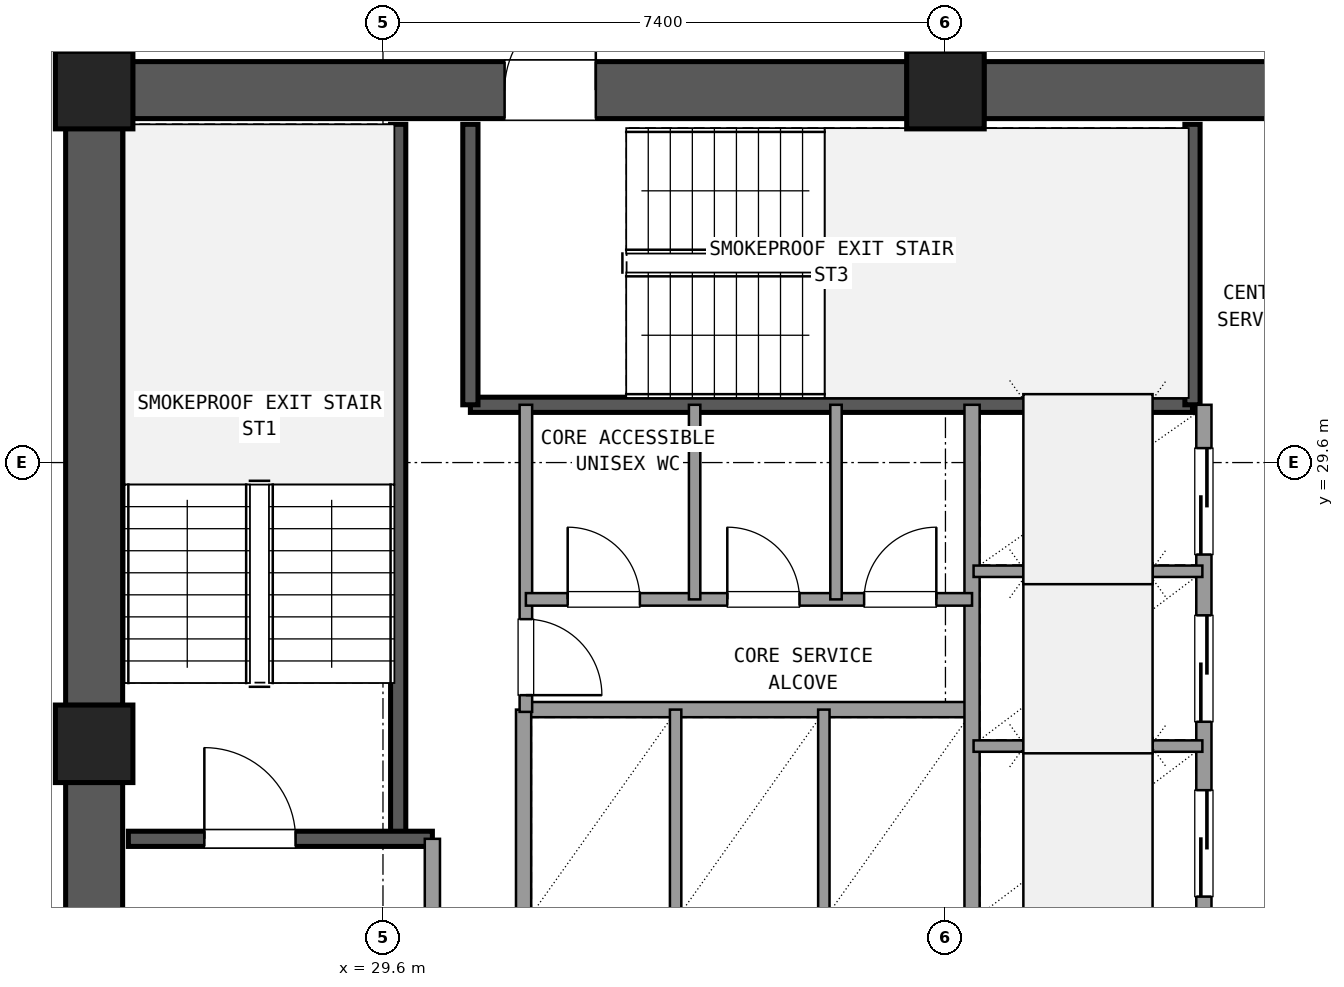
"""IFC4 building model, lengths in metres.
Left out: names, types, materials, properties, quantities, classifications, styles, units other than length and angle.
Written with IfcOpenShell. Run it as: python <this file> out.ifc"""

import sys

from ifc_helpers import new_model, si_unit, direction, frame, frame_2d, origin, origin_2d, place, context, subcontext, project, spatial, rectangle, extrude, element, fill, save


model = new_model("IFC4")
c1 = context("Model", 3, precision=1e-05, world=origin(), true_north=direction((0.0, 1.0)))
c2 = subcontext(c1, "Body", "Model", "MODEL_VIEW")
j1 = project(units=[si_unit("LENGTHUNIT", "METRE"), si_unit("PLANEANGLEUNIT", "RADIAN")], contexts=[c1])
p1 = place(None, origin())
s1 = spatial("IfcSite", under=j1, at=p1, CompositionType="ELEMENT")
p2 = place(p1, origin())
s2 = spatial("IfcBuilding", under=s1, at=p2, CompositionType="ELEMENT")
p3 = place(p2, frame((0.0, 0.0, 149.22)))
s3 = spatial("IfcBuildingStorey", under=s2, at=p3, CompositionType="ELEMENT", Elevation=149.22)
for number, where, z_axis, x_axis in (
    (1, (37.0, 34.5, 0.0), (0.0, 0.0, 1.0), (1.0, 0.0, 0.0)),
    (2, (25.8, 34.5, 0.0), (0.0, 0.0, 1.0), (1.0, 0.0, 0.0)),
    (3, (25.8, 25.9, 0.0), (0.0, 0.0, 1.0), (1.0, 0.0, 0.0)),
):
    element("IfcColumn", number, at=place(p3, frame(where, z_axis=z_axis, x_axis=x_axis)), inside=s3, PredefinedType="COLUMN", context=c2, shape_type="SweptSolid", body=[
        extrude(rectangle(XDim=1.02, YDim=1.02, at=origin_2d()), origin(), (0.0, 0.0, 1.0), 3.6),
    ])
p4 = place(p3, frame((47.695, 34.5, 0.0), z_axis=(0.0, 0.0, 1.0), x_axis=(-1.0, 0.0, 0.0)))
e4 = element("IfcWall", 4, at=p4, inside=s3, PredefinedType="SHEAR", context=c2, shape_type="SweptSolid", body=[
    extrude(rectangle(XDim=10.19, YDim=0.75, at=frame_2d((5.095, 0.0))), origin(), (0.0, 0.0, 1.0), 3.32),
])
p5 = place(p4, frame((4.595, 0.0, 0.0)))
e5 = element("IfcOpeningElement", 5, at=p5, cuts=e4, PredefinedType="OPENING", context=c2, shape_type="SweptSolid", body=[
    extrude(rectangle(XDim=1.6, YDim=2.2, at=frame_2d((0.8, 1.1))), frame((0.0, 0.385, 0.0), z_axis=(0.0, -1.0, 0.0), x_axis=(1.0, 0.0, 0.0)), (0.0, 0.0, 1.0), 0.77),
])
p6 = place(p3, frame((36.495, 34.5, 0.0), z_axis=(0.0, 0.0, 1.0), x_axis=(-1.0, 0.0, 0.0)))
e6 = element("IfcWall", 6, at=p6, inside=s3, PredefinedType="SHEAR", context=c2, shape_type="SweptSolid", body=[
    extrude(rectangle(XDim=10.19, YDim=0.75, at=frame_2d((5.095, 0.0))), origin(), (0.0, 0.0, 1.0), 3.32),
])
p7 = place(p6, frame((4.095, 0.0, 0.0)))
e7 = element("IfcOpeningElement", 7, at=p7, cuts=e6, PredefinedType="OPENING", context=c2, shape_type="SweptSolid", body=[
    extrude(rectangle(XDim=1.2, YDim=2.15, at=frame_2d((0.6, 1.075))), frame((0.0, 0.385, 0.0), z_axis=(0.0, -1.0, 0.0), x_axis=(1.0, 0.0, 0.0)), (0.0, 0.0, 1.0), 0.77),
])
p8 = place(p3, frame((25.8, 33.995, 0.0), z_axis=(0.0, 0.0, 1.0), x_axis=(0.0, -1.0, 0.0)))
e8 = element("IfcWall", 8, at=p8, inside=s3, PredefinedType="SHEAR", context=c2, shape_type="SweptSolid", body=[
    extrude(rectangle(XDim=7.59, YDim=0.75, at=frame_2d((3.795, 0.0))), origin(), (0.0, 0.0, 1.0), 3.32),
])
p9 = place(p3, frame((25.8, 25.395, 0.0), z_axis=(0.0, 0.0, 1.0), x_axis=(0.0, -1.0, 0.0)))
e9 = element("IfcWall", 9, at=p9, inside=s3, PredefinedType="SHEAR", context=c2, shape_type="SweptSolid", body=[
    extrude(rectangle(XDim=7.59, YDim=0.75, at=frame_2d((3.795, 0.0))), origin(), (0.0, 0.0, 1.0), 3.32),
])
p10 = place(p9, frame((2.145, 0.0, 0.0)))
e10 = element("IfcOpeningElement", 10, at=p10, cuts=e9, PredefinedType="OPENING", context=c2, shape_type="SweptSolid", body=[
    extrude(rectangle(XDim=1.2, YDim=2.15, at=frame_2d((0.6, 1.075))), frame((0.0, 0.385, 0.0), z_axis=(0.0, -1.0, 0.0), x_axis=(1.0, 0.0, 0.0)), (0.0, 0.0, 1.0), 0.77),
])
p11 = place(p3, frame((29.8, 24.65, 0.0), z_axis=(0.0, 0.0, 1.0), x_axis=(0.0, 1.0, 0.0)))
e11 = element("IfcWall", 11, at=p11, inside=s3, PredefinedType="SHEAR", context=c2, shape_type="SweptSolid", body=[
    extrude(rectangle(XDim=9.4, YDim=0.2, at=frame_2d((4.7, 0.0))), origin(), (0.0, 0.0, 1.0), 3.32),
])
p12 = place(p3, frame((26.25, 24.65, 0.0), z_axis=(0.0, 0.0, 1.0), x_axis=(1.0, 0.0, 0.0)))
e12 = element("IfcWall", 12, at=p12, inside=s3, PredefinedType="SHEAR", context=c2, shape_type="SweptSolid", body=[
    extrude(rectangle(XDim=4.0, YDim=0.2, at=frame_2d((2.0, 0.0))), origin(), (0.0, 0.0, 1.0), 3.32),
])
p13 = place(p12, frame((1.0, 0.0, 0.0)))
e13 = element("IfcOpeningElement", 13, at=p13, cuts=e12, PredefinedType="OPENING", context=c2, shape_type="SweptSolid", body=[
    extrude(rectangle(XDim=1.2, YDim=2.15, at=frame_2d((0.6, 1.075))), frame((0.0, 0.11, 0.0), z_axis=(0.0, -1.0, 0.0), x_axis=(1.0, 0.0, 0.0)), (0.0, 0.0, 1.0), 0.22),
])
p14 = place(p3, frame((30.75, 30.36, 0.0), z_axis=(0.0, 0.0, 1.0), x_axis=(1.0, 0.0, 0.0)))
e14 = element("IfcWall", 14, at=p14, inside=s3, PredefinedType="SHEAR", context=c2, shape_type="SweptSolid", body=[
    extrude(rectangle(XDim=9.5, YDim=0.2, at=frame_2d((4.75, 0.0))), origin(), (0.0, 0.0, 1.0), 3.32),
])
for number, where, z_axis, x_axis in (
    (15, (30.75, 30.36, 0.0), (0.0, 0.0, 1.0), (0.0, 1.0, 0.0)),
    (16, (40.25, 30.36, 0.0), (0.0, 0.0, 1.0), (0.0, 1.0, 0.0)),
):
    element("IfcWall", number, at=place(p3, frame(where, z_axis=z_axis, x_axis=x_axis)), inside=s3, PredefinedType="SHEAR", context=c2, shape_type="SweptSolid", body=[
        extrude(rectangle(XDim=3.69, YDim=0.2, at=frame_2d((1.845, 0.0))), origin(), (0.0, 0.0, 1.0), 3.32),
    ])
p15 = place(p3, frame((30.25, 17.75, 0.0), z_axis=(0.0, 0.0, 1.0), x_axis=(0.0, 1.0, 0.0)))
e17 = element("IfcWall", 17, at=p15, inside=s3, PredefinedType="SOLIDWALL", context=c2, shape_type="SweptSolid", body=[
    extrude(rectangle(XDim=6.9, YDim=0.2, at=frame_2d((3.45, 0.0))), origin(), (0.0, 0.0, 1.0), 2.61),
])
p16 = place(p15, frame((4.15, 0.0, 0.0)))
e18 = element("IfcOpeningElement", 18, at=p16, cuts=e17, PredefinedType="OPENING", context=c2, shape_type="SweptSolid", body=[
    extrude(rectangle(XDim=1.2, YDim=2.15, at=frame_2d((0.6, 1.075))), frame((0.0, 0.11, 0.0), z_axis=(0.0, -1.0, 0.0), x_axis=(1.0, 0.0, 0.0)), (0.0, 0.0, 1.0), 0.22),
])
p17 = place(p3, frame((31.45, 26.35, 0.0), z_axis=(0.0, 0.0, 1.0), x_axis=(1.0, 0.0, 0.0)))
e19 = element("IfcWall", 19, at=p17, inside=s3, PredefinedType="SOLIDWALL", context=c2, shape_type="SweptSolid", body=[
    extrude(rectangle(XDim=5.9, YDim=0.2, at=frame_2d((2.95, 0.0))), origin(), (0.0, 0.0, 1.0), 2.61),
])
p18 = place(p3, frame((31.45, 23.54, 0.0), z_axis=(0.0, 0.0, 1.0), x_axis=(0.0, 1.0, 0.0)))
e20 = element("IfcWall", 20, at=p18, inside=s3, PredefinedType="SOLIDWALL", context=c2, shape_type="SweptSolid", body=[
    extrude(rectangle(XDim=2.81, YDim=0.2, at=frame_2d((1.405, 0.0))), origin(), (0.0, 0.0, 1.0), 2.61),
])
for number, where, z_axis, x_axis in (
    (21, (33.45, 23.54, 0.0), (0.0, 0.0, 1.0), (0.0, 1.0, 0.0)),
    (22, (35.4, 23.54, 0.0), (0.0, 0.0, 1.0), (0.0, 1.0, 0.0)),
):
    element("IfcWall", number, at=place(p3, frame(where, z_axis=z_axis, x_axis=x_axis)), inside=s3, PredefinedType="PARTITIONING", context=c2, shape_type="SweptSolid", body=[
        extrude(rectangle(XDim=2.81, YDim=0.15, at=frame_2d((1.405, 0.0))), origin(), (0.0, 0.0, 1.0), 2.61),
    ])
p19 = place(p3, frame((37.35, 23.54, 0.0), z_axis=(0.0, 0.0, 1.0), x_axis=(0.0, 1.0, 0.0)))
e23 = element("IfcWall", 23, at=p19, inside=s3, PredefinedType="SOLIDWALL", context=c2, shape_type="SweptSolid", body=[
    extrude(rectangle(XDim=6.82, YDim=0.2, at=frame_2d((3.41, 0.0))), origin(), (0.0, 0.0, 1.0), 2.61),
])
p20 = place(p3, frame((40.4, 23.54, 0.0), z_axis=(0.0, 0.0, 1.0), x_axis=(0.0, 1.0, 0.0)))
e24 = element("IfcWall", 24, at=p20, inside=s3, PredefinedType="SOLIDWALL", context=c2, shape_type="SweptSolid", body=[
    extrude(rectangle(XDim=6.82, YDim=0.2, at=frame_2d((3.41, 0.0))), origin(), (0.0, 0.0, 1.0), 2.61),
])
p21 = place(p20, frame((0.35, 0.0, 0.0)))
e25 = element("IfcOpeningElement", 25, at=p21, cuts=e24, PredefinedType="OPENING", context=c2, shape_type="SweptSolid", body=[
    extrude(rectangle(XDim=1.4, YDim=2.2, at=frame_2d((0.7, 1.1))), frame((0.0, 0.11, 0.0), z_axis=(0.0, -1.0, 0.0), x_axis=(1.0, 0.0, 0.0)), (0.0, 0.0, 1.0), 0.22),
])
p22 = place(p20, frame((2.65, 0.0, 0.0)))
e26 = element("IfcOpeningElement", 26, at=p22, cuts=e24, PredefinedType="OPENING", context=c2, shape_type="SweptSolid", body=[
    extrude(rectangle(XDim=1.4, YDim=2.2, at=frame_2d((0.7, 1.1))), frame((0.0, 0.11, 0.0), z_axis=(0.0, -1.0, 0.0), x_axis=(1.0, 0.0, 0.0)), (0.0, 0.0, 1.0), 0.22),
])
p23 = place(p20, frame((4.85, 0.0, 0.0)))
e27 = element("IfcOpeningElement", 27, at=p23, cuts=e24, PredefinedType="OPENING", context=c2, shape_type="SweptSolid", body=[
    extrude(rectangle(XDim=1.4, YDim=2.2, at=frame_2d((0.7, 1.1))), frame((0.0, 0.11, 0.0), z_axis=(0.0, -1.0, 0.0), x_axis=(1.0, 0.0, 0.0)), (0.0, 0.0, 1.0), 0.22),
])
for number, where, z_axis, x_axis in (
    (28, (37.37, 25.87, 0.0), (0.0, 0.0, 1.0), (1.0, 0.0, 0.0)),
    (29, (37.37, 28.17, 0.0), (0.0, 0.0, 1.0), (1.0, 0.0, 0.0)),
):
    element("IfcWall", number, at=place(p3, frame(where, z_axis=z_axis, x_axis=x_axis)), inside=s3, PredefinedType="PARTITIONING", context=c2, shape_type="SweptSolid", body=[
        extrude(rectangle(XDim=3.01, YDim=0.15, at=frame_2d((1.505, 0.0))), origin(), (0.0, 0.0, 1.0), 2.61),
    ])
p24 = place(p3, frame((31.48, 26.32, 0.0), z_axis=(0.0, 0.0, 1.0), x_axis=(0.0, 1.0, 0.0)))
e30 = element("IfcWall", 30, at=p24, inside=s3, PredefinedType="PLUMBINGWALL", context=c2, shape_type="SweptSolid", body=[
    extrude(rectangle(XDim=4.04, YDim=0.165, at=frame_2d((2.02, 0.0))), origin(), (0.0, 0.0, 1.0), 2.61),
])
p25 = place(p24, frame((0.22, 0.0, 0.0)))
e31 = element("IfcOpeningElement", 31, at=p25, cuts=e30, PredefinedType="OPENING", context=c2, shape_type="SweptSolid", body=[
    extrude(rectangle(XDim=1.0, YDim=2.15, at=frame_2d((0.5, 1.075))), frame((0.0, 0.093, 0.0), z_axis=(0.0, -1.0, 0.0), x_axis=(1.0, 0.0, 0.0)), (0.0, 0.0, 1.0), 0.185),
])
p26 = place(p3, frame((31.48, 27.8, 0.0), z_axis=(0.0, 0.0, 1.0), x_axis=(1.0, 0.0, 0.0)))
e32 = element("IfcWall", 32, at=p26, inside=s3, PredefinedType="PLUMBINGWALL", context=c2, shape_type="SweptSolid", body=[
    extrude(rectangle(XDim=5.87, YDim=0.165, at=frame_2d((2.935, 0.0))), origin(), (0.0, 0.0, 1.0), 2.61),
])
p27 = place(p26, frame((0.55, 0.0, 0.0)))
e33 = element("IfcOpeningElement", 33, at=p27, cuts=e32, PredefinedType="OPENING", context=c2, shape_type="SweptSolid", body=[
    extrude(rectangle(XDim=0.95, YDim=2.1, at=frame_2d((0.475, 1.05))), frame((0.0, 0.093, 0.0), z_axis=(0.0, -1.0, 0.0), x_axis=(1.0, 0.0, 0.0)), (0.0, 0.0, 1.0), 0.185),
])
p28 = place(p26, frame((2.65, 0.0, 0.0)))
e34 = element("IfcOpeningElement", 34, at=p28, cuts=e32, PredefinedType="OPENING", context=c2, shape_type="SweptSolid", body=[
    extrude(rectangle(XDim=0.95, YDim=2.1, at=frame_2d((0.475, 1.05))), frame((0.0, 0.093, 0.0), z_axis=(0.0, -1.0, 0.0), x_axis=(1.0, 0.0, 0.0)), (0.0, 0.0, 1.0), 0.185),
])
p29 = place(p26, frame((4.45, 0.0, 0.0)))
e35 = element("IfcOpeningElement", 35, at=p29, cuts=e32, PredefinedType="OPENING", context=c2, shape_type="SweptSolid", body=[
    extrude(rectangle(XDim=0.95, YDim=2.1, at=frame_2d((0.475, 1.05))), frame((0.0, 0.093, 0.0), z_axis=(0.0, -1.0, 0.0), x_axis=(1.0, 0.0, 0.0)), (0.0, 0.0, 1.0), 0.185),
])
for number, where, z_axis, x_axis in (
    (36, (33.7, 27.8, 0.0), (0.0, 0.0, 1.0), (0.0, 1.0, 0.0)),
    (37, (35.56, 27.8, 0.0), (0.0, 0.0, 1.0), (0.0, 1.0, 0.0)),
):
    element("IfcWall", number, at=place(p3, frame(where, z_axis=z_axis, x_axis=x_axis)), inside=s3, PredefinedType="PARTITIONING", context=c2, shape_type="SweptSolid", body=[
        extrude(rectangle(XDim=2.56, YDim=0.15, at=frame_2d((1.28, 0.0))), origin(), (0.0, 0.0, 1.0), 2.61),
    ])
p30 = place(p3, frame((37.0, 34.95, 0.0), z_axis=(0.0, 0.0, 1.0), x_axis=(0.0, 1.0, 0.0)))
e38 = element("IfcWall", 38, at=p30, inside=s3, PredefinedType="PARTITIONING", context=c2, shape_type="SweptSolid", body=[
    extrude(rectangle(XDim=3.21, YDim=0.18, at=frame_2d((1.605, 0.0))), origin(), (0.0, 0.0, 1.0), 2.61),
])
p31 = place(p30, frame((0.605, 0.0, 0.0)))
e39 = element("IfcOpeningElement", 39, at=p31, cuts=e38, PredefinedType="OPENING", context=c2, shape_type="SweptSolid", body=[
    extrude(rectangle(XDim=2.0, YDim=2.2, at=frame_2d((1.0, 1.1))), frame((0.0, 0.1, 0.0), z_axis=(0.0, -1.0, 0.0), x_axis=(1.0, 0.0, 0.0)), (0.0, 0.0, 1.0), 0.2),
])
p32 = place(p13, origin())
e40 = element("IfcDoor", 40, at=p32, inside=s3, OperationType="SINGLE_SWING_LEFT", PredefinedType="DOOR", context=c2, shape_type="SweptSolid", body=[
    extrude(rectangle(XDim=1.2, YDim=2.15, at=frame_2d((0.6, 1.075))), frame((0.0, 0.025, 0.0), z_axis=(0.0, -1.0, 0.0), x_axis=(1.0, 0.0, 0.0)), (0.0, 0.0, 1.0), 0.05),
])
fill(e13, e40)
p33 = place(p7, frame((1.2, 0.0, 0.0), z_axis=(0.0, 0.0, 1.0), x_axis=(-1.0, 0.0, 0.0)))
e41 = element("IfcDoor", 41, at=p33, inside=s3, OperationType="SINGLE_SWING_LEFT", PredefinedType="DOOR", context=c2, shape_type="SweptSolid", body=[
    extrude(rectangle(XDim=1.2, YDim=2.15, at=frame_2d((0.6, 1.075))), frame((0.0, 0.025, 0.0), z_axis=(0.0, -1.0, 0.0), x_axis=(1.0, 0.0, 0.0)), (0.0, 0.0, 1.0), 0.05),
])
fill(e7, e41)
p34 = place(p21, origin())
e42 = element("IfcDoor", 42, at=p34, inside=s3, OperationType="SLIDING_TO_LEFT", PredefinedType="DOOR", context=c2, shape_type="SweptSolid", body=[
    extrude(rectangle(XDim=1.4, YDim=2.2, at=frame_2d((0.7, 1.1))), frame((0.0, 0.025, 0.0), z_axis=(0.0, -1.0, 0.0), x_axis=(1.0, 0.0, 0.0)), (0.0, 0.0, 1.0), 0.05),
])
fill(e25, e42)
p35 = place(p22, origin())
e43 = element("IfcDoor", 43, at=p35, inside=s3, OperationType="SLIDING_TO_LEFT", PredefinedType="DOOR", context=c2, shape_type="SweptSolid", body=[
    extrude(rectangle(XDim=1.4, YDim=2.2, at=frame_2d((0.7, 1.1))), frame((0.0, 0.025, 0.0), z_axis=(0.0, -1.0, 0.0), x_axis=(1.0, 0.0, 0.0)), (0.0, 0.0, 1.0), 0.05),
])
fill(e26, e43)
p36 = place(p23, origin())
e44 = element("IfcDoor", 44, at=p36, inside=s3, OperationType="SLIDING_TO_RIGHT", PredefinedType="DOOR", context=c2, shape_type="SweptSolid", body=[
    extrude(rectangle(XDim=1.4, YDim=2.2, at=frame_2d((0.7, 1.1))), frame((0.0, 0.025, 0.0), z_axis=(0.0, -1.0, 0.0), x_axis=(1.0, 0.0, 0.0)), (0.0, 0.0, 1.0), 0.05),
])
fill(e27, e44)
p37 = place(p25, frame((1.0, 0.0, 0.0), z_axis=(0.0, 0.0, 1.0), x_axis=(-1.0, 0.0, 0.0)))
e45 = element("IfcDoor", 45, at=p37, inside=s3, OperationType="SINGLE_SWING_LEFT", PredefinedType="DOOR", context=c2, shape_type="SweptSolid", body=[
    extrude(rectangle(XDim=1.0, YDim=2.15, at=frame_2d((0.5, 1.075))), frame((0.0, 0.025, 0.0), z_axis=(0.0, -1.0, 0.0), x_axis=(1.0, 0.0, 0.0)), (0.0, 0.0, 1.0), 0.05),
])
fill(e31, e45)
p38 = place(p27, origin())
e46 = element("IfcDoor", 46, at=p38, inside=s3, OperationType="SINGLE_SWING_LEFT", PredefinedType="DOOR", context=c2, shape_type="SweptSolid", body=[
    extrude(rectangle(XDim=0.95, YDim=2.1, at=frame_2d((0.475, 1.05))), frame((0.0, 0.025, 0.0), z_axis=(0.0, -1.0, 0.0), x_axis=(1.0, 0.0, 0.0)), (0.0, 0.0, 1.0), 0.05),
])
fill(e33, e46)
p39 = place(p28, origin())
e47 = element("IfcDoor", 47, at=p39, inside=s3, OperationType="SINGLE_SWING_LEFT", PredefinedType="DOOR", context=c2, shape_type="SweptSolid", body=[
    extrude(rectangle(XDim=0.95, YDim=2.1, at=frame_2d((0.475, 1.05))), frame((0.0, 0.025, 0.0), z_axis=(0.0, -1.0, 0.0), x_axis=(1.0, 0.0, 0.0)), (0.0, 0.0, 1.0), 0.05),
])
fill(e34, e47)
p40 = place(p29, origin())
e48 = element("IfcDoor", 48, at=p40, inside=s3, OperationType="SINGLE_SWING_RIGHT", PredefinedType="DOOR", context=c2, shape_type="SweptSolid", body=[
    extrude(rectangle(XDim=0.95, YDim=2.1, at=frame_2d((0.475, 1.05))), frame((0.0, 0.025, 0.0), z_axis=(0.0, -1.0, 0.0), x_axis=(1.0, 0.0, 0.0)), (0.0, 0.0, 1.0), 0.05),
])
fill(e35, e48)
save(model, sys.argv[1])
